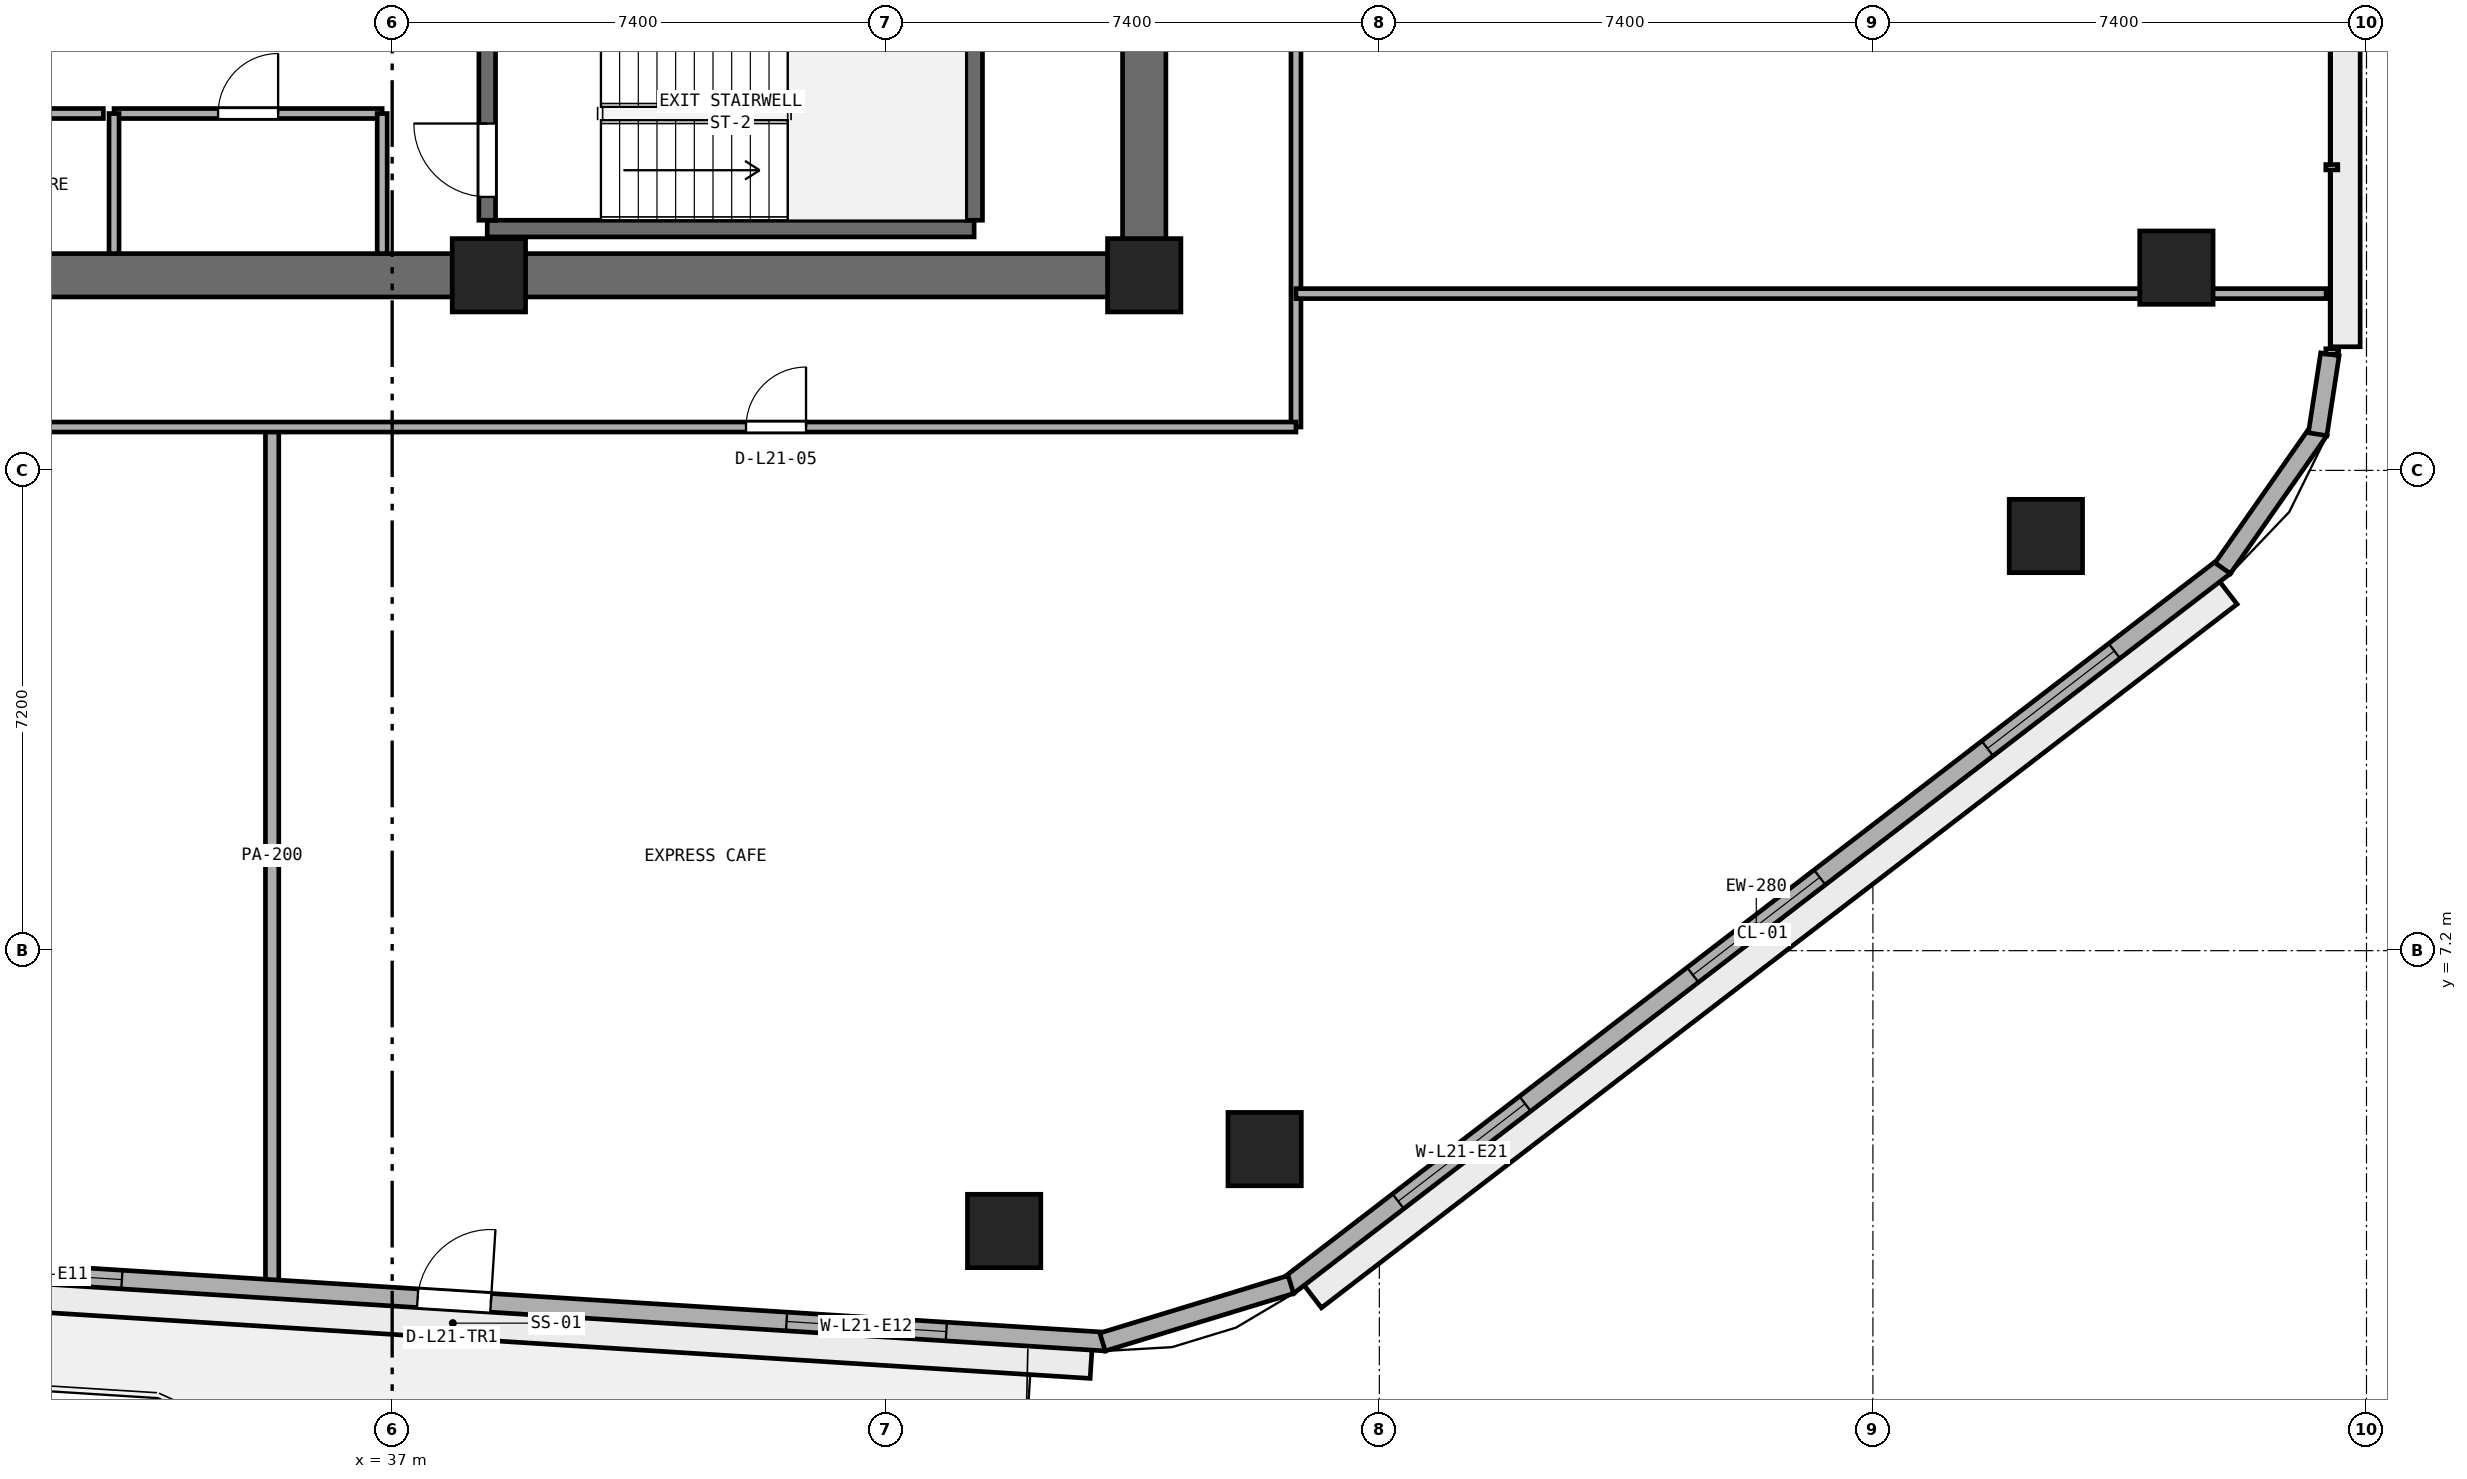
"""IFC4 building model, lengths in metres.
Left out: names, types, materials, properties, quantities, classifications, styles, units other than length and angle.
Written with IfcOpenShell. Run it as: python <this file> out.ifc"""

import sys

from ifc_helpers import new_model, si_unit, direction, frame, frame_2d, origin, origin_2d, place, context, subcontext, project, spatial, rectangle, extrude, element, fill, save


model = new_model("IFC4")
c1 = context("Model", 3, precision=1e-05, world=origin(), true_north=direction((0.0, 1.0)))
c2 = subcontext(c1, "Body", "Model", "MODEL_VIEW")
j1 = project(units=[si_unit("LENGTHUNIT", "METRE"), si_unit("PLANEANGLEUNIT", "RADIAN")], contexts=[c1])
p1 = place(None, origin())
s1 = spatial("IfcSite", under=j1, at=p1, CompositionType="ELEMENT")
p2 = place(p1, origin())
s2 = spatial("IfcBuilding", under=s1, at=p2, CompositionType="ELEMENT")
p3 = place(p2, frame((0.0, 0.0, 85.8)))
s3 = spatial("IfcBuildingStorey", under=s2, at=p3, CompositionType="ELEMENT", Elevation=85.8)
p4 = place(p3, frame((25.4, 17.325, 0.0), z_axis=(0.0, 0.0, 1.0), x_axis=(1.0, 0.0, 0.0)))
e1 = element("IfcWall", 1, at=p4, inside=s3, PredefinedType="SHEAR", context=c2, shape_type="SweptSolid", body=[
    extrude(rectangle(XDim=23.2, YDim=0.65, at=frame_2d((11.6, 0.0))), origin(), (0.0, 0.0, 1.0), 3.525),
])
p5 = place(p3, frame((48.275, 17.65, 0.0), z_axis=(0.0, 0.0, 1.0), x_axis=(0.0, 1.0, 0.0)))
e2 = element("IfcWall", 2, at=p5, inside=s3, PredefinedType="SHEAR", context=c2, shape_type="SweptSolid", body=[
    extrude(rectangle(XDim=15.1, YDim=0.65, at=frame_2d((7.55, 0.0))), origin(), (0.0, 0.0, 1.0), 3.525),
])
p6 = place(p5, frame((5.65, 0.0, 0.0)))
e3 = element("IfcOpeningElement", 3, at=p6, cuts=e2, PredefinedType="OPENING", context=c2, shape_type="SweptSolid", body=[
    extrude(rectangle(XDim=1.5, YDim=2.15, at=frame_2d((0.75, 1.075))), frame((0.0, 0.335, 0.0), z_axis=(0.0, -1.0, 0.0), x_axis=(1.0, 0.0, 0.0)), (0.0, 0.0, 1.0), 0.67),
])
for number, where, z_axis, x_axis in (
    (4, (38.45, 17.325, 0.0), (0.0, 0.0, 1.0), (1.0, 0.0, 0.0)),
    (5, (48.275, 17.325, 0.0), (0.0, 0.0, 1.0), (1.0, 0.0, 0.0)),
):
    element("IfcColumn", number, at=place(p3, frame(where, z_axis=z_axis, x_axis=x_axis)), inside=s3, PredefinedType="PILASTER", context=c2, shape_type="SweptSolid", body=[
        extrude(rectangle(XDim=1.1, YDim=1.1, at=origin_2d()), origin(), (0.0, 0.0, 1.0), 3.8),
    ])
for number, where, z_axis, x_axis in (
    (6, (46.175, 2.998, 0.0), (0.0, 0.0, 1.0), (1.0, 0.0, 0.0)),
    (7, (50.081, 4.225, 0.0), (0.0, 0.0, 1.0), (1.0, 0.0, 0.0)),
    (8, (61.793, 13.416, 0.0), (0.0, 0.0, 1.0), (1.0, 0.0, 0.0)),
    (9, (63.75, 17.44, 0.0), (0.0, 0.0, 1.0), (1.0, 0.0, 0.0)),
):
    element("IfcColumn", number, at=place(p3, frame(where, z_axis=z_axis, x_axis=x_axis)), inside=s3, PredefinedType="COLUMN", context=c2, shape_type="SweptSolid", body=[
        extrude(rectangle(XDim=1.1, YDim=1.1, at=origin_2d()), origin(), (0.0, 0.0, 1.0), 3.8),
    ])
p7 = place(p3, frame((38.425, 18.025, 0.0), z_axis=(0.0, 0.0, 1.0), x_axis=(1.0, 0.0, 0.0)))
e10 = element("IfcWall", 10, at=p7, inside=s3, PredefinedType="SHEAR", context=c2, shape_type="SweptSolid", body=[
    extrude(rectangle(XDim=7.3, YDim=0.25, at=frame_2d((3.65, 0.0))), origin(), (0.0, 0.0, 1.0), 3.525),
])
p8 = place(p3, frame((38.425, 18.15, 0.0), z_axis=(0.0, 0.0, 1.0), x_axis=(0.0, 1.0, 0.0)))
e11 = element("IfcWall", 11, at=p8, inside=s3, PredefinedType="SHEAR", context=c2, shape_type="SweptSolid", body=[
    extrude(rectangle(XDim=3.2, YDim=0.25, at=frame_2d((1.6, 0.0))), origin(), (0.0, 0.0, 1.0), 3.525),
])
p9 = place(p8, frame((0.35, 0.0, 0.0)))
e12 = element("IfcOpeningElement", 12, at=p9, cuts=e11, PredefinedType="OPENING", context=c2, shape_type="SweptSolid", body=[
    extrude(rectangle(XDim=1.1, YDim=2.15, at=frame_2d((0.55, 1.075))), frame((0.0, 0.135, 0.0), z_axis=(0.0, -1.0, 0.0), x_axis=(1.0, 0.0, 0.0)), (0.0, 0.0, 1.0), 0.27),
])
p10 = place(p3, frame((45.725, 18.15, 0.0), z_axis=(0.0, 0.0, 1.0), x_axis=(0.0, 1.0, 0.0)))
e13 = element("IfcWall", 13, at=p10, inside=s3, PredefinedType="SHEAR", context=c2, shape_type="SweptSolid", body=[
    extrude(rectangle(XDim=3.2, YDim=0.25, at=frame_2d((1.6, 0.0))), origin(), (0.0, 0.0, 1.0), 3.525),
])
p11 = place(p3, frame((29.48, 19.75, 0.0), z_axis=(0.0, 0.0, 1.0), x_axis=(1.0, 0.0, 0.0)))
e14 = element("IfcWall", 14, at=p11, inside=s3, PredefinedType="PARTITIONING", context=c2, shape_type="SweptSolid", body=[
    extrude(rectangle(XDim=3.19, YDim=0.15, at=frame_2d((1.595, 0.0))), origin(), (0.0, 0.0, 1.0), 3.525),
])
p12 = place(p11, frame((1.145, 0.0, 0.0)))
e15 = element("IfcOpeningElement", 15, at=p12, cuts=e14, PredefinedType="OPENING", context=c2, shape_type="SweptSolid", body=[
    extrude(rectangle(XDim=0.9, YDim=2.1, at=frame_2d((0.45, 1.05))), frame((0.0, 0.085, 0.0), z_axis=(0.0, -1.0, 0.0), x_axis=(1.0, 0.0, 0.0)), (0.0, 0.0, 1.0), 0.17),
])
p13 = place(p3, frame((32.83, 19.75, 0.0), z_axis=(0.0, 0.0, 1.0), x_axis=(1.0, 0.0, 0.0)))
e16 = element("IfcWall", 16, at=p13, inside=s3, PredefinedType="PARTITIONING", context=c2, shape_type="SweptSolid", body=[
    extrude(rectangle(XDim=4.02, YDim=0.15, at=frame_2d((2.01, 0.0))), origin(), (0.0, 0.0, 1.0), 3.525),
])
p14 = place(p13, frame((1.56, 0.0, 0.0)))
e17 = element("IfcOpeningElement", 17, at=p14, cuts=e16, PredefinedType="OPENING", context=c2, shape_type="SweptSolid", body=[
    extrude(rectangle(XDim=0.9, YDim=2.1, at=frame_2d((0.45, 1.05))), frame((0.0, 0.085, 0.0), z_axis=(0.0, -1.0, 0.0), x_axis=(1.0, 0.0, 0.0)), (0.0, 0.0, 1.0), 0.17),
])
for number, where, z_axis, x_axis in (
    (18, (32.83, 17.65, 0.0), (0.0, 0.0, 1.0), (0.0, 1.0, 0.0)),
    (19, (36.85, 17.65, 0.0), (0.0, 0.0, 1.0), (0.0, 1.0, 0.0)),
):
    element("IfcWall", number, at=place(p3, frame(where, z_axis=z_axis, x_axis=x_axis)), inside=s3, PredefinedType="PARTITIONING", context=c2, shape_type="SweptSolid", body=[
        extrude(rectangle(XDim=2.1, YDim=0.15, at=frame_2d((1.05, 0.0))), origin(), (0.0, 0.0, 1.0), 3.525),
    ])
p15 = place(p3, frame((50.55, 15.05, 0.0), z_axis=(0.0, 0.0, 1.0), x_axis=(0.0, 1.0, 0.0)))
e20 = element("IfcWall", 20, at=p15, inside=s3, PredefinedType="PARTITIONING", context=c2, shape_type="SweptSolid", body=[
    extrude(rectangle(XDim=20.3, YDim=0.15, at=frame_2d((10.15, 0.0))), origin(), (0.0, 0.0, 1.0), 3.525),
])
p16 = place(p15, frame((9.7, 0.0, 0.0)))
e21 = element("IfcOpeningElement", 21, at=p16, cuts=e20, PredefinedType="OPENING", context=c2, shape_type="SweptSolid", body=[
    extrude(rectangle(XDim=0.9, YDim=2.1, at=frame_2d((0.45, 1.05))), frame((0.0, 0.085, 0.0), z_axis=(0.0, -1.0, 0.0), x_axis=(1.0, 0.0, 0.0)), (0.0, 0.0, 1.0), 0.17),
])
p17 = place(p3, frame((35.2, 2.192, 0.0), z_axis=(0.0, 0.0, 1.0), x_axis=(0.0, 1.0, 0.0)))
e22 = element("IfcWall", 22, at=p17, inside=s3, PredefinedType="PARTITIONING", context=c2, shape_type="SweptSolid", body=[
    extrude(rectangle(XDim=12.858, YDim=0.2, at=frame_2d((6.429, 0.0))), origin(), (0.0, 0.0, 1.0), 3.525),
])
p18 = place(p3, frame((23.45, 15.05, 0.0), z_axis=(0.0, 0.0, 1.0), x_axis=(1.0, 0.0, 0.0)))
e23 = element("IfcWall", 23, at=p18, inside=s3, PredefinedType="PARTITIONING", context=c2, shape_type="SweptSolid", body=[
    extrude(rectangle(XDim=27.1, YDim=0.15, at=frame_2d((13.55, 0.0))), origin(), (0.0, 0.0, 1.0), 3.525),
])
p19 = place(p18, frame((5.17, 0.0, 0.0)))
e24 = element("IfcOpeningElement", 24, at=p19, cuts=e23, PredefinedType="OPENING", context=c2, shape_type="SweptSolid", body=[
    extrude(rectangle(XDim=1.65, YDim=2.15, at=frame_2d((0.825, 1.075))), frame((0.0, 0.085, 0.0), z_axis=(0.0, -1.0, 0.0), x_axis=(1.0, 0.0, 0.0)), (0.0, 0.0, 1.0), 0.17),
])
p20 = place(p18, frame((18.855, 0.0, 0.0)))
e25 = element("IfcOpeningElement", 25, at=p20, cuts=e23, PredefinedType="OPENING", context=c2, shape_type="SweptSolid", body=[
    extrude(rectangle(XDim=0.9, YDim=2.1, at=frame_2d((0.45, 1.05))), frame((0.0, 0.085, 0.0), z_axis=(0.0, -1.0, 0.0), x_axis=(1.0, 0.0, 0.0)), (0.0, 0.0, 1.0), 0.17),
])
p21 = place(p3, frame((50.55, 17.05, 0.0), z_axis=(0.0, 0.0, 1.0), x_axis=(1.0, 0.0, 0.0)))
e26 = element("IfcWall", 26, at=p21, inside=s3, PredefinedType="PARTITIONING", context=c2, shape_type="SweptSolid", body=[
    extrude(rectangle(XDim=15.445, YDim=0.15, at=frame_2d((7.723, 0.0))), origin(), (0.0, 0.0, 1.0), 3.525),
])
p22 = place(p3, frame((28.161, 2.571, 0.0), z_axis=(0.0, 0.0, 1.0), x_axis=(0.998017288298, -0.06294038654, 0.0)))
e27 = element("IfcWall", 27, at=p22, inside=s3, PredefinedType="STANDARD", context=c2, shape_type="SweptSolid", body=[
    extrude(rectangle(XDim=19.577, YDim=0.28, at=frame_2d((9.789, 0.0))), origin(), (0.0, 0.0, 1.0), 3.525),
])
p23 = place(p22, frame((9.239, 0.0, 0.0)))
e28 = element("IfcOpeningElement", 28, at=p23, cuts=e27, PredefinedType="OPENING", context=c2, shape_type="SweptSolid", body=[
    extrude(rectangle(XDim=1.1, YDim=2.2, at=frame_2d((0.55, 1.1))), frame((0.0, 0.15, 0.0), z_axis=(0.0, -1.0, 0.0), x_axis=(1.0, 0.0, 0.0)), (0.0, 0.0, 1.0), 0.3),
])
p24 = place(p22, frame((2.396, 0.0, 0.9)))
e29 = element("IfcOpeningElement", 29, at=p24, cuts=e27, PredefinedType="OPENING", context=c2, shape_type="SweptSolid", body=[
    extrude(rectangle(XDim=2.4, YDim=1.75, at=frame_2d((1.2, 0.875))), frame((0.0, 0.15, 0.0), z_axis=(0.0, -1.0, 0.0), x_axis=(1.0, 0.0, 0.0)), (0.0, 0.0, 1.0), 0.3),
])
p25 = place(p22, frame((14.781, 0.0, 0.9)))
e30 = element("IfcOpeningElement", 30, at=p25, cuts=e27, PredefinedType="OPENING", context=c2, shape_type="SweptSolid", body=[
    extrude(rectangle(XDim=2.4, YDim=1.75, at=frame_2d((1.2, 0.875))), frame((0.0, 0.15, 0.0), z_axis=(0.0, -1.0, 0.0), x_axis=(1.0, 0.0, 0.0)), (0.0, 0.0, 1.0), 0.3),
])
p26 = place(p3, frame((50.429, 2.172, 0.0), z_axis=(0.0, 0.0, 1.0), x_axis=(0.792937466367, 0.609303023488, 0.0)))
e31 = element("IfcWall", 31, at=p26, inside=s3, PredefinedType="STANDARD", context=c2, shape_type="SweptSolid", body=[
    extrude(rectangle(XDim=17.713, YDim=0.28, at=frame_2d((8.856, 0.0))), origin(), (0.0, 0.0, 1.0), 3.525),
])
p27 = place(p26, frame((2.085, 0.0, 0.9)))
e32 = element("IfcOpeningElement", 32, at=p27, cuts=e31, PredefinedType="OPENING", context=c2, shape_type="SweptSolid", body=[
    extrude(rectangle(XDim=2.4, YDim=1.75, at=frame_2d((1.2, 0.875))), frame((0.0, 0.15, 0.0), z_axis=(0.0, -1.0, 0.0), x_axis=(1.0, 0.0, 0.0)), (0.0, 0.0, 1.0), 0.3),
])
p28 = place(p26, frame((7.656, 0.0, 0.9)))
e33 = element("IfcOpeningElement", 33, at=p28, cuts=e31, PredefinedType="OPENING", context=c2, shape_type="SweptSolid", body=[
    extrude(rectangle(XDim=2.4, YDim=1.75, at=frame_2d((1.2, 0.875))), frame((0.0, 0.15, 0.0), z_axis=(0.0, -1.0, 0.0), x_axis=(1.0, 0.0, 0.0)), (0.0, 0.0, 1.0), 0.3),
])
p29 = place(p26, frame((13.227, 0.0, 0.9)))
e34 = element("IfcOpeningElement", 34, at=p29, cuts=e31, PredefinedType="OPENING", context=c2, shape_type="SweptSolid", body=[
    extrude(rectangle(XDim=2.4, YDim=1.75, at=frame_2d((1.2, 0.875))), frame((0.0, 0.15, 0.0), z_axis=(0.0, -1.0, 0.0), x_axis=(1.0, 0.0, 0.0)), (0.0, 0.0, 1.0), 0.3),
])
p30 = place(p3, frame((47.65, 1.333, 0.0), z_axis=(0.0, 0.0, 1.0), x_axis=(0.956461287977, 0.291859220516, 0.0)))
e35 = element("IfcWall", 35, at=p30, inside=s3, PredefinedType="STANDARD", context=c2, shape_type="SweptSolid", body=[
    extrude(rectangle(XDim=2.952, YDim=0.28, at=frame_2d((1.476, 0.0))), origin(), (0.0, 0.0, 1.0), 3.525),
])
p31 = place(p3, frame((64.444, 12.933, 0.0), z_axis=(0.0, 0.0, 1.0), x_axis=(0.573176686443, 0.819431806875, 0.0)))
e36 = element("IfcWall", 36, at=p31, inside=s3, PredefinedType="STANDARD", context=c2, shape_type="SweptSolid", body=[
    extrude(rectangle(XDim=2.524, YDim=0.28, at=frame_2d((1.262, 0.0))), origin(), (0.0, 0.0, 1.0), 3.525),
])
p32 = place(p3, frame((65.867, 14.943, 0.0), z_axis=(0.0, 0.0, 1.0), x_axis=(0.152102600021, 0.988364709541, 0.0)))
e37 = element("IfcWall", 37, at=p32, inside=s3, PredefinedType="STANDARD", context=c2, shape_type="SweptSolid", body=[
    extrude(rectangle(XDim=1.212, YDim=0.28, at=frame_2d((0.606, 0.0))), origin(), (0.0, 0.0, 1.0), 3.525),
])
p33 = place(p9, origin())
e38 = element("IfcDoor", 38, at=p33, inside=s3, OperationType="SINGLE_SWING_RIGHT", PredefinedType="DOOR", context=c2, shape_type="SweptSolid", body=[
    extrude(rectangle(XDim=1.1, YDim=2.15, at=frame_2d((0.55, 1.075))), frame((0.0, 0.025, 0.0), z_axis=(0.0, -1.0, 0.0), x_axis=(1.0, 0.0, 0.0)), (0.0, 0.0, 1.0), 0.05),
])
fill(e12, e38)
p34 = place(p14, origin())
e39 = element("IfcDoor", 39, at=p34, inside=s3, OperationType="SINGLE_SWING_RIGHT", PredefinedType="DOOR", context=c2, shape_type="SweptSolid", body=[
    extrude(rectangle(XDim=0.9, YDim=2.1, at=frame_2d((0.45, 1.05))), frame((0.0, 0.025, 0.0), z_axis=(0.0, -1.0, 0.0), x_axis=(1.0, 0.0, 0.0)), (0.0, 0.0, 1.0), 0.05),
])
fill(e17, e39)
p35 = place(p20, origin())
e40 = element("IfcDoor", 40, at=p35, inside=s3, OperationType="SINGLE_SWING_RIGHT", PredefinedType="DOOR", context=c2, shape_type="SweptSolid", body=[
    extrude(rectangle(XDim=0.9, YDim=2.1, at=frame_2d((0.45, 1.05))), frame((0.0, 0.025, 0.0), z_axis=(0.0, -1.0, 0.0), x_axis=(1.0, 0.0, 0.0)), (0.0, 0.0, 1.0), 0.05),
])
fill(e25, e40)
p36 = place(p23, origin())
e41 = element("IfcDoor", 41, at=p36, inside=s3, OperationType="SINGLE_SWING_RIGHT", PredefinedType="DOOR", context=c2, shape_type="SweptSolid", body=[
    extrude(rectangle(XDim=1.1, YDim=2.2, at=frame_2d((0.55, 1.1))), frame((0.0, 0.025, 0.0), z_axis=(0.0, -1.0, 0.0), x_axis=(1.0, 0.0, 0.0)), (0.0, 0.0, 1.0), 0.05),
])
fill(e28, e41)
p37 = place(p24, origin())
e42 = element("IfcWindow", 42, at=p37, inside=s3, PartitioningType="SINGLE_PANEL", PredefinedType="WINDOW", context=c2, shape_type="SweptSolid", body=[
    extrude(rectangle(XDim=2.4, YDim=1.75, at=frame_2d((1.2, 0.875))), frame((0.0, 0.03, 0.0), z_axis=(0.0, -1.0, 0.0), x_axis=(1.0, 0.0, 0.0)), (0.0, 0.0, 1.0), 0.06),
])
fill(e29, e42)
p38 = place(p25, origin())
e43 = element("IfcWindow", 43, at=p38, inside=s3, PartitioningType="SINGLE_PANEL", PredefinedType="WINDOW", context=c2, shape_type="SweptSolid", body=[
    extrude(rectangle(XDim=2.4, YDim=1.75, at=frame_2d((1.2, 0.875))), frame((0.0, 0.03, 0.0), z_axis=(0.0, -1.0, 0.0), x_axis=(1.0, 0.0, 0.0)), (0.0, 0.0, 1.0), 0.06),
])
fill(e30, e43)
p39 = place(p27, origin())
e44 = element("IfcWindow", 44, at=p39, inside=s3, PartitioningType="SINGLE_PANEL", PredefinedType="WINDOW", context=c2, shape_type="SweptSolid", body=[
    extrude(rectangle(XDim=2.4, YDim=1.75, at=frame_2d((1.2, 0.875))), frame((0.0, 0.03, 0.0), z_axis=(0.0, -1.0, 0.0), x_axis=(1.0, 0.0, 0.0)), (0.0, 0.0, 1.0), 0.06),
])
fill(e32, e44)
p40 = place(p28, origin())
e45 = element("IfcWindow", 45, at=p40, inside=s3, PartitioningType="SINGLE_PANEL", PredefinedType="WINDOW", context=c2, shape_type="SweptSolid", body=[
    extrude(rectangle(XDim=2.4, YDim=1.75, at=frame_2d((1.2, 0.875))), frame((0.0, 0.03, 0.0), z_axis=(0.0, -1.0, 0.0), x_axis=(1.0, 0.0, 0.0)), (0.0, 0.0, 1.0), 0.06),
])
fill(e33, e45)
p41 = place(p29, origin())
e46 = element("IfcWindow", 46, at=p41, inside=s3, PartitioningType="SINGLE_PANEL", PredefinedType="WINDOW", context=c2, shape_type="SweptSolid", body=[
    extrude(rectangle(XDim=2.4, YDim=1.75, at=frame_2d((1.2, 0.875))), frame((0.0, 0.03, 0.0), z_axis=(0.0, -1.0, 0.0), x_axis=(1.0, 0.0, 0.0)), (0.0, 0.0, 1.0), 0.06),
])
fill(e34, e46)
save(model, sys.argv[1])
